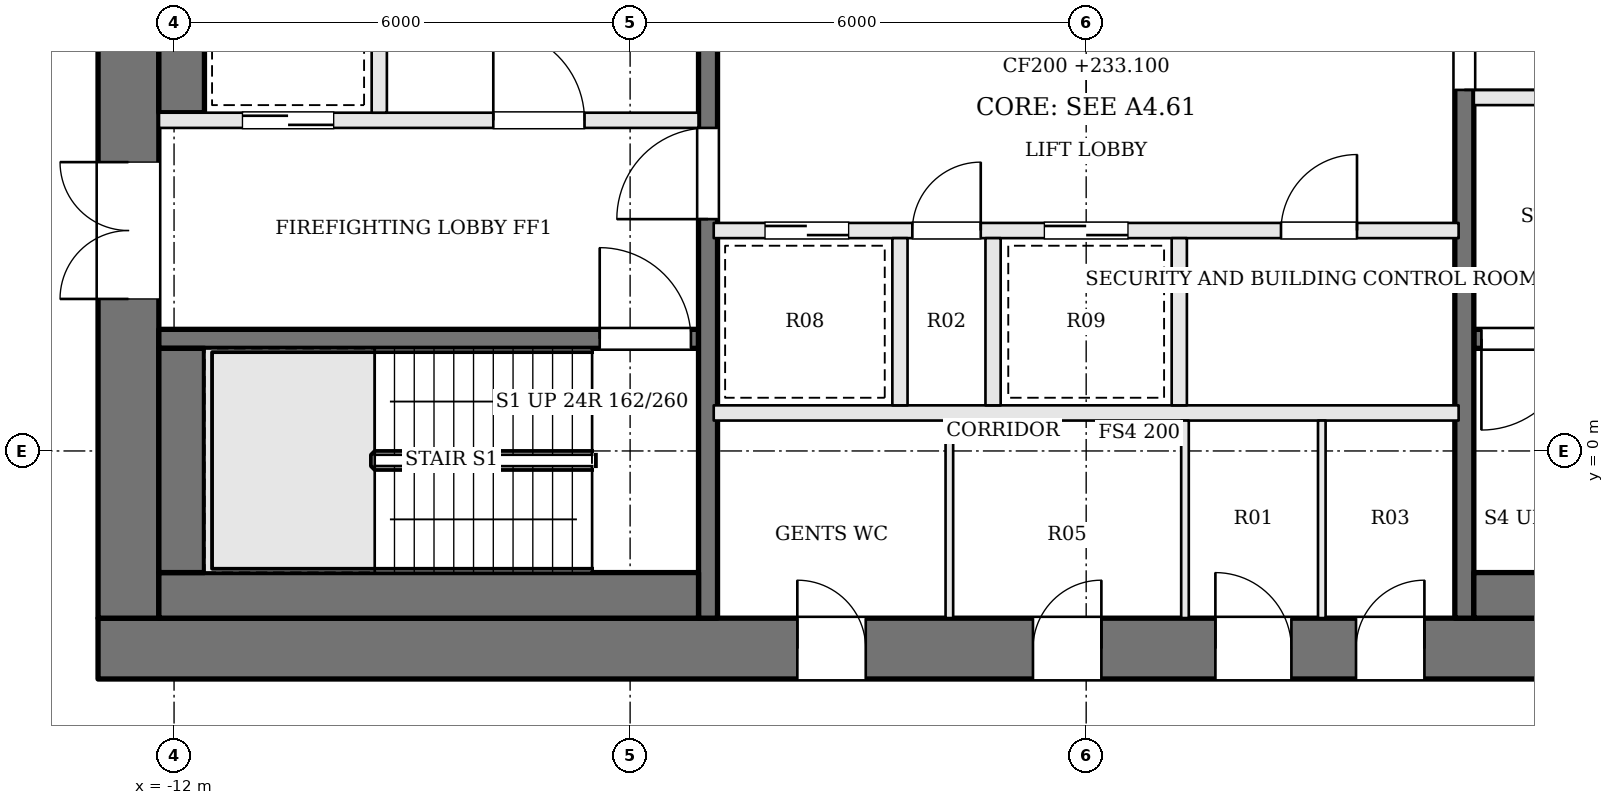
"""IFC4 building model, lengths in metres.
Left out: names, types, materials, properties, quantities, classifications, styles, units other than length and angle.
Written with IfcOpenShell. Run it as: python <this file> out.ifc"""

import sys

from ifc_helpers import new_model, si_unit, direction, frame, frame_2d, origin, place, context, subcontext, project, spatial, rectangle, extrude, element, fill, save


model = new_model("IFC4")
c1 = context("Model", 3, precision=1e-05, world=origin(), true_north=direction((0.0, 1.0)))
c2 = subcontext(c1, "Body", "Model", "MODEL_VIEW")
j1 = project(units=[si_unit("LENGTHUNIT", "METRE"), si_unit("PLANEANGLEUNIT", "RADIAN")], contexts=[c1])
p1 = place(None, origin())
s1 = spatial("IfcSite", under=j1, at=p1, CompositionType="ELEMENT")
p2 = place(p1, origin())
s2 = spatial("IfcBuilding", under=s1, at=p2, CompositionType="ELEMENT")
p3 = place(p2, frame((0.0, 0.0, 233.1)))
s3 = spatial("IfcBuildingStorey", under=s2, at=p3, CompositionType="ELEMENT", Elevation=233.1)
p4 = place(p3, frame((-13.0, -2.6, 0.0), z_axis=(0.0, 0.0, 1.0), x_axis=(1.0, 0.0, 0.0)))
e1 = element("IfcWall", 1, at=p4, inside=s3, PredefinedType="SHEAR", context=c2, shape_type="SweptSolid", body=[
    extrude(rectangle(XDim=26.0, YDim=0.8, at=frame_2d((13.0, 0.0))), origin(), (0.0, 0.0, 1.0), 3.9),
])
p5 = place(p4, frame((9.2, 0.0, 0.0)))
e2 = element("IfcOpeningElement", 2, at=p5, cuts=e1, PredefinedType="OPENING", context=c2, shape_type="SweptSolid", body=[
    extrude(rectangle(XDim=0.9, YDim=2.1, at=frame_2d((0.45, 1.05))), frame((0.0, 0.41, 0.0), z_axis=(0.0, -1.0, 0.0), x_axis=(1.0, 0.0, 0.0)), (0.0, 0.0, 1.0), 0.82),
])
p6 = place(p4, frame((12.3, 0.0, 0.0)))
e3 = element("IfcOpeningElement", 3, at=p6, cuts=e1, PredefinedType="OPENING", context=c2, shape_type="SweptSolid", body=[
    extrude(rectangle(XDim=0.9, YDim=2.1, at=frame_2d((0.45, 1.05))), frame((0.0, 0.41, 0.0), z_axis=(0.0, -1.0, 0.0), x_axis=(1.0, 0.0, 0.0)), (0.0, 0.0, 1.0), 0.82),
])
p7 = place(p4, frame((14.7, 0.0, 0.0)))
e4 = element("IfcOpeningElement", 4, at=p7, cuts=e1, PredefinedType="OPENING", context=c2, shape_type="SweptSolid", body=[
    extrude(rectangle(XDim=1.0, YDim=2.1, at=frame_2d((0.5, 1.05))), frame((0.0, 0.41, 0.0), z_axis=(0.0, -1.0, 0.0), x_axis=(1.0, 0.0, 0.0)), (0.0, 0.0, 1.0), 0.82),
])
p8 = place(p4, frame((16.55, 0.0, 0.0)))
e5 = element("IfcOpeningElement", 5, at=p8, cuts=e1, PredefinedType="OPENING", context=c2, shape_type="SweptSolid", body=[
    extrude(rectangle(XDim=0.9, YDim=2.1, at=frame_2d((0.45, 1.05))), frame((0.0, 0.41, 0.0), z_axis=(0.0, -1.0, 0.0), x_axis=(1.0, 0.0, 0.0)), (0.0, 0.0, 1.0), 0.82),
])
p9 = place(p3, frame((-12.6, -2.2, 0.0), z_axis=(0.0, 0.0, 1.0), x_axis=(0.0, 1.0, 0.0)))
e6 = element("IfcWall", 6, at=p9, inside=s3, PredefinedType="SHEAR", context=c2, shape_type="SweptSolid", body=[
    extrude(rectangle(XDim=13.4, YDim=0.8, at=frame_2d((6.7, 0.0))), origin(), (0.0, 0.0, 1.0), 3.9),
])
p10 = place(p9, frame((4.2, 0.0, 0.0)))
e7 = element("IfcOpeningElement", 7, at=p10, cuts=e6, PredefinedType="OPENING", context=c2, shape_type="SweptSolid", body=[
    extrude(rectangle(XDim=1.8, YDim=2.1, at=frame_2d((0.9, 1.05))), frame((0.0, 0.41, 0.0), z_axis=(0.0, -1.0, 0.0), x_axis=(1.0, 0.0, 0.0)), (0.0, 0.0, 1.0), 0.82),
])
p11 = place(p3, frame((-12.2, 1.475, 0.0), z_axis=(0.0, 0.0, 1.0), x_axis=(1.0, 0.0, 0.0)))
e8 = element("IfcWall", 8, at=p11, inside=s3, PredefinedType="SOLIDWALL", context=c2, shape_type="SweptSolid", body=[
    extrude(rectangle(XDim=7.1, YDim=0.25, at=frame_2d((3.55, 0.0))), origin(), (0.0, 0.0, 1.0), 3.7),
])
p12 = place(p11, frame((5.8, 0.0, 0.0)))
e9 = element("IfcOpeningElement", 9, at=p12, cuts=e8, PredefinedType="OPENING", context=c2, shape_type="SweptSolid", body=[
    extrude(rectangle(XDim=1.2, YDim=2.1, at=frame_2d((0.6, 1.05))), frame((0.0, 0.135, 0.0), z_axis=(0.0, -1.0, 0.0), x_axis=(1.0, 0.0, 0.0)), (0.0, 0.0, 1.0), 0.27),
])
p13 = place(p3, frame((-12.2, 4.35, 0.0), z_axis=(0.0, 0.0, 1.0), x_axis=(1.0, 0.0, 0.0)))
e10 = element("IfcWall", 10, at=p13, inside=s3, PredefinedType="SOLIDWALL", context=c2, shape_type="SweptSolid", body=[
    extrude(rectangle(XDim=7.1, YDim=0.2, at=frame_2d((3.55, 0.0))), origin(), (0.0, 0.0, 1.0), 3.7),
])
p14 = place(p13, frame((4.4, 0.0, 0.0)))
e11 = element("IfcOpeningElement", 11, at=p14, cuts=e10, PredefinedType="OPENING", context=c2, shape_type="SweptSolid", body=[
    extrude(rectangle(XDim=1.2, YDim=2.1, at=frame_2d((0.6, 1.05))), frame((0.0, 0.11, 0.0), z_axis=(0.0, -1.0, 0.0), x_axis=(1.0, 0.0, 0.0)), (0.0, 0.0, 1.0), 0.22),
])
p15 = place(p13, frame((1.1, 0.0, 0.0)))
e12 = element("IfcOpeningElement", 12, at=p15, cuts=e10, PredefinedType="OPENING", context=c2, shape_type="SweptSolid", body=[
    extrude(rectangle(XDim=1.2, YDim=2.1, at=frame_2d((0.6, 1.05))), frame((0.0, 0.11, 0.0), z_axis=(0.0, -1.0, 0.0), x_axis=(1.0, 0.0, 0.0)), (0.0, 0.0, 1.0), 0.22),
])
p16 = place(p3, frame((12.2, 4.65, 0.0), z_axis=(0.0, 0.0, 1.0), x_axis=(-1.0, 0.0, 0.0)))
e13 = element("IfcWall", 13, at=p16, inside=s3, PredefinedType="SOLIDWALL", context=c2, shape_type="SweptSolid", body=[
    extrude(rectangle(XDim=7.1, YDim=0.2, at=frame_2d((3.55, 0.0))), origin(), (0.0, 0.0, 1.0), 3.7),
])
p17 = place(p16, frame((4.4, 0.0, 0.0)))
e14 = element("IfcOpeningElement", 14, at=p17, cuts=e13, PredefinedType="OPENING", context=c2, shape_type="SweptSolid", body=[
    extrude(rectangle(XDim=1.2, YDim=2.1, at=frame_2d((0.6, 1.05))), frame((0.0, 0.11, 0.0), z_axis=(0.0, -1.0, 0.0), x_axis=(1.0, 0.0, 0.0)), (0.0, 0.0, 1.0), 0.22),
])
p18 = place(p16, frame((1.1, 0.0, 0.0)))
e15 = element("IfcOpeningElement", 15, at=p18, cuts=e13, PredefinedType="OPENING", context=c2, shape_type="SweptSolid", body=[
    extrude(rectangle(XDim=1.2, YDim=2.1, at=frame_2d((0.6, 1.05))), frame((0.0, 0.11, 0.0), z_axis=(0.0, -1.0, 0.0), x_axis=(1.0, 0.0, 0.0)), (0.0, 0.0, 1.0), 0.22),
])
p19 = place(p3, frame((12.2, 1.475, 0.0), z_axis=(0.0, 0.0, 1.0), x_axis=(-1.0, 0.0, 0.0)))
e16 = element("IfcWall", 16, at=p19, inside=s3, PredefinedType="SOLIDWALL", context=c2, shape_type="SweptSolid", body=[
    extrude(rectangle(XDim=7.1, YDim=0.25, at=frame_2d((3.55, 0.0))), origin(), (0.0, 0.0, 1.0), 3.7),
])
p20 = place(p19, frame((5.8, 0.0, 0.0)))
e17 = element("IfcOpeningElement", 17, at=p20, cuts=e16, PredefinedType="OPENING", context=c2, shape_type="SweptSolid", body=[
    extrude(rectangle(XDim=1.2, YDim=2.1, at=frame_2d((0.6, 1.05))), frame((0.0, 0.135, 0.0), z_axis=(0.0, -1.0, 0.0), x_axis=(1.0, 0.0, 0.0)), (0.0, 0.0, 1.0), 0.27),
])
p21 = place(p3, frame((-9.3, 4.45, 0.0), z_axis=(0.0, 0.0, 1.0), x_axis=(0.0, 1.0, 0.0)))
e18 = element("IfcWall", 18, at=p21, inside=s3, PredefinedType="SOLIDWALL", context=c2, shape_type="SweptSolid", body=[
    extrude(rectangle(XDim=3.0, YDim=0.2, at=frame_2d((1.5, 0.0))), origin(), (0.0, 0.0, 1.0), 3.7),
])
p22 = place(p3, frame((-4.975, -2.2, 0.0), z_axis=(0.0, 0.0, 1.0), x_axis=(0.0, 1.0, 0.0)))
e19 = element("IfcWall", 19, at=p22, inside=s3, PredefinedType="SOLIDWALL", context=c2, shape_type="SweptSolid", body=[
    extrude(rectangle(XDim=13.4, YDim=0.25, at=frame_2d((6.7, 0.0))), origin(), (0.0, 0.0, 1.0), 3.7),
])
p23 = place(p22, frame((5.25, 0.0, 0.0)))
e20 = element("IfcOpeningElement", 20, at=p23, cuts=e19, PredefinedType="OPENING", context=c2, shape_type="SweptSolid", body=[
    extrude(rectangle(XDim=1.2, YDim=2.1, at=frame_2d((0.6, 1.05))), frame((0.0, 0.135, 0.0), z_axis=(0.0, -1.0, 0.0), x_axis=(1.0, 0.0, 0.0)), (0.0, 0.0, 1.0), 0.27),
])
p24 = place(p3, frame((4.975, 11.2, 0.0), z_axis=(0.0, 0.0, 1.0), x_axis=(0.0, -1.0, 0.0)))
e21 = element("IfcWall", 21, at=p24, inside=s3, PredefinedType="SOLIDWALL", context=c2, shape_type="SweptSolid", body=[
    extrude(rectangle(XDim=13.4, YDim=0.25, at=frame_2d((6.7, 0.0))), origin(), (0.0, 0.0, 1.0), 3.7),
])
p25 = place(p24, frame((5.25, 0.0, 0.0)))
e22 = element("IfcOpeningElement", 22, at=p25, cuts=e21, PredefinedType="OPENING", context=c2, shape_type="SweptSolid", body=[
    extrude(rectangle(XDim=1.2, YDim=2.1, at=frame_2d((0.6, 1.05))), frame((0.0, 0.135, 0.0), z_axis=(0.0, -1.0, 0.0), x_axis=(1.0, 0.0, 0.0)), (0.0, 0.0, 1.0), 0.27),
])
p26 = place(p3, frame((-12.2, -1.9, 0.0), z_axis=(0.0, 0.0, 1.0), x_axis=(1.0, 0.0, 0.0)))
e23 = element("IfcWall", 23, at=p26, inside=s3, PredefinedType="SOLIDWALL", context=c2, shape_type="SweptSolid", body=[
    extrude(rectangle(XDim=7.1, YDim=0.6, at=frame_2d((3.55, 0.0))), origin(), (0.0, 0.0, 1.0), 3.7),
])
p27 = place(p3, frame((-11.9, -1.6, 0.0), z_axis=(0.0, 0.0, 1.0), x_axis=(0.0, 1.0, 0.0)))
e24 = element("IfcWall", 24, at=p27, inside=s3, PredefinedType="SOLIDWALL", context=c2, shape_type="SweptSolid", body=[
    extrude(rectangle(XDim=2.95, YDim=0.6, at=frame_2d((1.475, 0.0))), origin(), (0.0, 0.0, 1.0), 3.7),
])
p28 = place(p3, frame((-11.9, 4.45, 0.0), z_axis=(0.0, 0.0, 1.0), x_axis=(0.0, 1.0, 0.0)))
e25 = element("IfcWall", 25, at=p28, inside=s3, PredefinedType="SOLIDWALL", context=c2, shape_type="SweptSolid", body=[
    extrude(rectangle(XDim=3.0, YDim=0.6, at=frame_2d((1.5, 0.0))), origin(), (0.0, 0.0, 1.0), 3.7),
])
p29 = place(p3, frame((12.2, -1.9, 0.0), z_axis=(0.0, 0.0, 1.0), x_axis=(-1.0, 0.0, 0.0)))
e26 = element("IfcWall", 26, at=p29, inside=s3, PredefinedType="SOLIDWALL", context=c2, shape_type="SweptSolid", body=[
    extrude(rectangle(XDim=7.1, YDim=0.6, at=frame_2d((3.55, 0.0))), origin(), (0.0, 0.0, 1.0), 3.7),
])
p30 = place(p3, frame((-4.9, 0.5, 0.0), z_axis=(0.0, 0.0, 1.0), x_axis=(1.0, 0.0, 0.0)))
e27 = element("IfcWall", 27, at=p30, inside=s3, PredefinedType="SOLIDWALL", context=c2, shape_type="SweptSolid", body=[
    extrude(rectangle(XDim=9.8, YDim=0.2, at=frame_2d((4.9, 0.0))), origin(), (0.0, 0.0, 1.0), 3.7),
])
p31 = place(p3, frame((-4.9, 2.9, 0.0), z_axis=(0.0, 0.0, 1.0), x_axis=(1.0, 0.0, 0.0)))
e28 = element("IfcWall", 28, at=p31, inside=s3, PredefinedType="SOLIDWALL", context=c2, shape_type="SweptSolid", body=[
    extrude(rectangle(XDim=9.8, YDim=0.2, at=frame_2d((4.9, 0.0))), origin(), (0.0, 0.0, 1.0), 3.7),
])
p32 = place(p31, frame((0.675, 0.0, 0.0)))
e29 = element("IfcOpeningElement", 29, at=p32, cuts=e28, PredefinedType="OPENING", context=c2, shape_type="SweptSolid", body=[
    extrude(rectangle(XDim=1.1, YDim=2.1, at=frame_2d((0.55, 1.05))), frame((0.0, 0.11, 0.0), z_axis=(0.0, -1.0, 0.0), x_axis=(1.0, 0.0, 0.0)), (0.0, 0.0, 1.0), 0.22),
])
p33 = place(p31, frame((2.613, 0.0, 0.0)))
e30 = element("IfcOpeningElement", 30, at=p33, cuts=e28, PredefinedType="OPENING", context=c2, shape_type="SweptSolid", body=[
    extrude(rectangle(XDim=0.9, YDim=2.1, at=frame_2d((0.45, 1.05))), frame((0.0, 0.11, 0.0), z_axis=(0.0, -1.0, 0.0), x_axis=(1.0, 0.0, 0.0)), (0.0, 0.0, 1.0), 0.22),
])
p34 = place(p31, frame((4.35, 0.0, 0.0)))
e31 = element("IfcOpeningElement", 31, at=p34, cuts=e28, PredefinedType="OPENING", context=c2, shape_type="SweptSolid", body=[
    extrude(rectangle(XDim=1.1, YDim=2.1, at=frame_2d((0.55, 1.05))), frame((0.0, 0.11, 0.0), z_axis=(0.0, -1.0, 0.0), x_axis=(1.0, 0.0, 0.0)), (0.0, 0.0, 1.0), 0.22),
])
p35 = place(p31, frame((7.463, 0.0, 0.0)))
e32 = element("IfcOpeningElement", 32, at=p35, cuts=e28, PredefinedType="OPENING", context=c2, shape_type="SweptSolid", body=[
    extrude(rectangle(XDim=1.0, YDim=2.1, at=frame_2d((0.5, 1.05))), frame((0.0, 0.11, 0.0), z_axis=(0.0, -1.0, 0.0), x_axis=(1.0, 0.0, 0.0)), (0.0, 0.0, 1.0), 0.22),
])
for number, where, z_axis, x_axis in (
    (33, (-2.45, 0.6, 0.0), (0.0, 0.0, 1.0), (0.0, 1.0, 0.0)),
    (34, (-1.225, 0.6, 0.0), (0.0, 0.0, 1.0), (0.0, 1.0, 0.0)),
    (35, (1.225, 0.6, 0.0), (0.0, 0.0, 1.0), (0.0, 1.0, 0.0)),
):
    element("IfcWall", number, at=place(p3, frame(where, z_axis=z_axis, x_axis=x_axis)), inside=s3, PredefinedType="SOLIDWALL", context=c2, shape_type="SweptSolid", body=[
        extrude(rectangle(XDim=2.2, YDim=0.2, at=frame_2d((1.1, 0.0))), origin(), (0.0, 0.0, 1.0), 3.7),
    ])
for number, where, z_axis, x_axis in (
    (36, (-1.8, -2.2, 0.0), (0.0, 0.0, 1.0), (0.0, 1.0, 0.0)),
    (37, (1.3, -2.2, 0.0), (0.0, 0.0, 1.0), (0.0, 1.0, 0.0)),
    (38, (3.1, -2.2, 0.0), (0.0, 0.0, 1.0), (0.0, 1.0, 0.0)),
):
    element("IfcWall", number, at=place(p3, frame(where, z_axis=z_axis, x_axis=x_axis)), inside=s3, PredefinedType="PARTITIONING", context=c2, shape_type="SweptSolid", body=[
        extrude(rectangle(XDim=2.6, YDim=0.1, at=frame_2d((1.3, 0.0))), origin(), (0.0, 0.0, 1.0), 3.7),
    ])
p36 = place(p10, origin())
e39 = element("IfcDoor", 39, at=p36, inside=s3, OperationType="DOUBLE_DOOR_SINGLE_SWING", PredefinedType="DOOR", context=c2, shape_type="SweptSolid", body=[
    extrude(rectangle(XDim=1.8, YDim=2.1, at=frame_2d((0.9, 1.05))), frame((0.0, 0.025, 0.0), z_axis=(0.0, -1.0, 0.0), x_axis=(1.0, 0.0, 0.0)), (0.0, 0.0, 1.0), 0.05),
])
fill(e7, e39)
p37 = place(p23, origin())
e40 = element("IfcDoor", 40, at=p37, inside=s3, OperationType="SINGLE_SWING_LEFT", PredefinedType="DOOR", context=c2, shape_type="SweptSolid", body=[
    extrude(rectangle(XDim=1.2, YDim=2.1, at=frame_2d((0.6, 1.05))), frame((0.0, 0.025, 0.0), z_axis=(0.0, -1.0, 0.0), x_axis=(1.0, 0.0, 0.0)), (0.0, 0.0, 1.0), 0.05),
])
fill(e20, e40)
p38 = place(p25, origin())
e41 = element("IfcDoor", 41, at=p38, inside=s3, OperationType="SINGLE_SWING_RIGHT", PredefinedType="DOOR", context=c2, shape_type="SweptSolid", body=[
    extrude(rectangle(XDim=1.2, YDim=2.1, at=frame_2d((0.6, 1.05))), frame((0.0, 0.025, 0.0), z_axis=(0.0, -1.0, 0.0), x_axis=(1.0, 0.0, 0.0)), (0.0, 0.0, 1.0), 0.05),
])
fill(e22, e41)
p39 = place(p14, origin())
e42 = element("IfcDoor", 42, at=p39, inside=s3, OperationType="SINGLE_SWING_LEFT", PredefinedType="DOOR", context=c2, shape_type="SweptSolid", body=[
    extrude(rectangle(XDim=1.2, YDim=2.1, at=frame_2d((0.6, 1.05))), frame((0.0, 0.025, 0.0), z_axis=(0.0, -1.0, 0.0), x_axis=(1.0, 0.0, 0.0)), (0.0, 0.0, 1.0), 0.05),
])
fill(e11, e42)
p40 = place(p12, origin())
e43 = element("IfcDoor", 43, at=p40, inside=s3, OperationType="SINGLE_SWING_LEFT", PredefinedType="DOOR", context=c2, shape_type="SweptSolid", body=[
    extrude(rectangle(XDim=1.2, YDim=2.1, at=frame_2d((0.6, 1.05))), frame((0.0, 0.025, 0.0), z_axis=(0.0, -1.0, 0.0), x_axis=(1.0, 0.0, 0.0)), (0.0, 0.0, 1.0), 0.05),
])
fill(e9, e43)
p41 = place(p20, origin())
e44 = element("IfcDoor", 44, at=p41, inside=s3, OperationType="SINGLE_SWING_RIGHT", PredefinedType="DOOR", context=c2, shape_type="SweptSolid", body=[
    extrude(rectangle(XDim=1.2, YDim=2.1, at=frame_2d((0.6, 1.05))), frame((0.0, 0.025, 0.0), z_axis=(0.0, -1.0, 0.0), x_axis=(1.0, 0.0, 0.0)), (0.0, 0.0, 1.0), 0.05),
])
fill(e17, e44)
p42 = place(p15, origin())
e45 = element("IfcDoor", 45, at=p42, inside=s3, OperationType="SLIDING_TO_RIGHT", PredefinedType="DOOR", context=c2, shape_type="SweptSolid", body=[
    extrude(rectangle(XDim=1.2, YDim=2.1, at=frame_2d((0.6, 1.05))), frame((0.0, 0.025, 0.0), z_axis=(0.0, -1.0, 0.0), x_axis=(1.0, 0.0, 0.0)), (0.0, 0.0, 1.0), 0.05),
])
fill(e12, e45)
p43 = place(p32, origin())
e46 = element("IfcDoor", 46, at=p43, inside=s3, OperationType="SLIDING_TO_RIGHT", PredefinedType="DOOR", context=c2, shape_type="SweptSolid", body=[
    extrude(rectangle(XDim=1.1, YDim=2.1, at=frame_2d((0.55, 1.05))), frame((0.0, 0.025, 0.0), z_axis=(0.0, -1.0, 0.0), x_axis=(1.0, 0.0, 0.0)), (0.0, 0.0, 1.0), 0.05),
])
fill(e29, e46)
p44 = place(p33, origin())
e47 = element("IfcDoor", 47, at=p44, inside=s3, OperationType="SINGLE_SWING_RIGHT", PredefinedType="DOOR", context=c2, shape_type="SweptSolid", body=[
    extrude(rectangle(XDim=0.9, YDim=2.1, at=frame_2d((0.45, 1.05))), frame((0.0, 0.025, 0.0), z_axis=(0.0, -1.0, 0.0), x_axis=(1.0, 0.0, 0.0)), (0.0, 0.0, 1.0), 0.05),
])
fill(e30, e47)
p45 = place(p34, origin())
e48 = element("IfcDoor", 48, at=p45, inside=s3, OperationType="SLIDING_TO_LEFT", PredefinedType="DOOR", context=c2, shape_type="SweptSolid", body=[
    extrude(rectangle(XDim=1.1, YDim=2.1, at=frame_2d((0.55, 1.05))), frame((0.0, 0.025, 0.0), z_axis=(0.0, -1.0, 0.0), x_axis=(1.0, 0.0, 0.0)), (0.0, 0.0, 1.0), 0.05),
])
fill(e31, e48)
p46 = place(p35, origin())
e49 = element("IfcDoor", 49, at=p46, inside=s3, OperationType="SINGLE_SWING_RIGHT", PredefinedType="DOOR", context=c2, shape_type="SweptSolid", body=[
    extrude(rectangle(XDim=1.0, YDim=2.1, at=frame_2d((0.5, 1.05))), frame((0.0, 0.025, 0.0), z_axis=(0.0, -1.0, 0.0), x_axis=(1.0, 0.0, 0.0)), (0.0, 0.0, 1.0), 0.05),
])
fill(e32, e49)
p47 = place(p5, origin())
e50 = element("IfcDoor", 50, at=p47, inside=s3, OperationType="SINGLE_SWING_LEFT", PredefinedType="DOOR", context=c2, shape_type="SweptSolid", body=[
    extrude(rectangle(XDim=0.9, YDim=2.1, at=frame_2d((0.45, 1.05))), frame((0.0, 0.025, 0.0), z_axis=(0.0, -1.0, 0.0), x_axis=(1.0, 0.0, 0.0)), (0.0, 0.0, 1.0), 0.05),
])
fill(e2, e50)
p48 = place(p6, origin())
e51 = element("IfcDoor", 51, at=p48, inside=s3, OperationType="SINGLE_SWING_RIGHT", PredefinedType="DOOR", context=c2, shape_type="SweptSolid", body=[
    extrude(rectangle(XDim=0.9, YDim=2.1, at=frame_2d((0.45, 1.05))), frame((0.0, 0.025, 0.0), z_axis=(0.0, -1.0, 0.0), x_axis=(1.0, 0.0, 0.0)), (0.0, 0.0, 1.0), 0.05),
])
fill(e3, e51)
p49 = place(p7, origin())
e52 = element("IfcDoor", 52, at=p49, inside=s3, OperationType="SINGLE_SWING_LEFT", PredefinedType="DOOR", context=c2, shape_type="SweptSolid", body=[
    extrude(rectangle(XDim=1.0, YDim=2.1, at=frame_2d((0.5, 1.05))), frame((0.0, 0.025, 0.0), z_axis=(0.0, -1.0, 0.0), x_axis=(1.0, 0.0, 0.0)), (0.0, 0.0, 1.0), 0.05),
])
fill(e4, e52)
p50 = place(p8, origin())
e53 = element("IfcDoor", 53, at=p50, inside=s3, OperationType="SINGLE_SWING_RIGHT", PredefinedType="DOOR", context=c2, shape_type="SweptSolid", body=[
    extrude(rectangle(XDim=0.9, YDim=2.1, at=frame_2d((0.45, 1.05))), frame((0.0, 0.025, 0.0), z_axis=(0.0, -1.0, 0.0), x_axis=(1.0, 0.0, 0.0)), (0.0, 0.0, 1.0), 0.05),
])
fill(e5, e53)
save(model, sys.argv[1])
